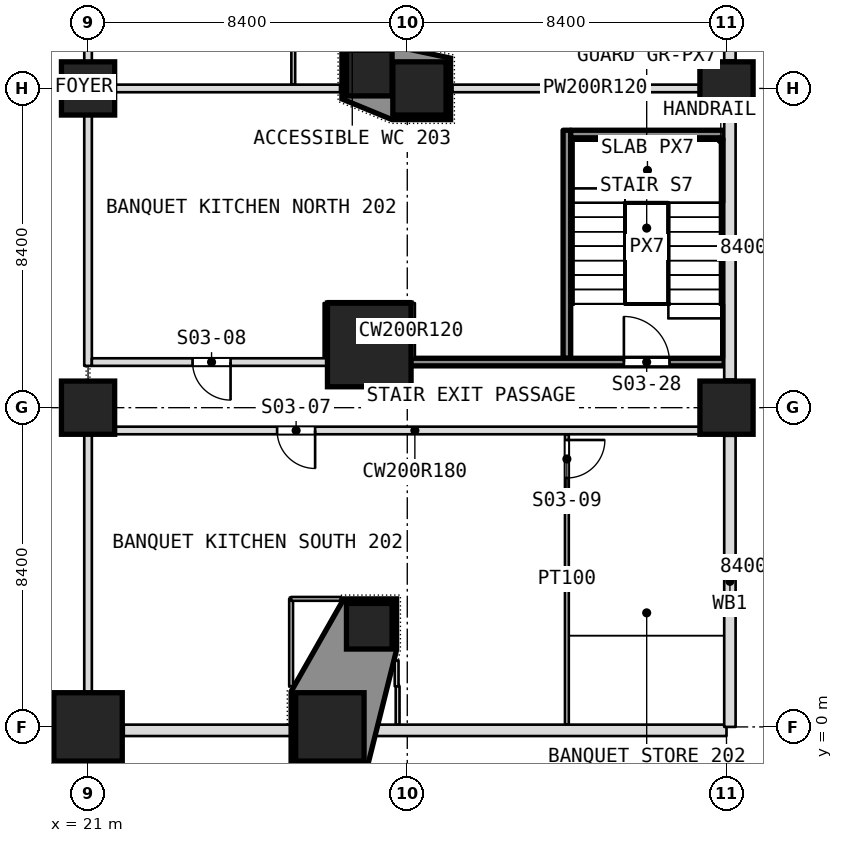
"""IFC4 building model, lengths in metres.
Left out: names, types, materials, properties, quantities, classifications, styles, units other than length and angle.
Written with IfcOpenShell. Run it as: python <this file> out.ifc"""

import sys

from ifc_helpers import new_model, si_unit, direction, frame, frame_2d, origin, origin_2d, place, context, subcontext, project, spatial, polyline, rectangle, outline, extrude, element, fill, save


model = new_model("IFC4")
c1 = context("Model", 3, precision=1e-05, world=origin(), true_north=direction((0.0, 1.0)))
c2 = subcontext(c1, "Body", "Model", "MODEL_VIEW")
j1 = project(units=[si_unit("LENGTHUNIT", "METRE"), si_unit("PLANEANGLEUNIT", "RADIAN")], contexts=[c1])
p1 = place(None, origin())
s1 = spatial("IfcSite", under=j1, at=p1, CompositionType="ELEMENT")
p2 = place(p1, origin())
s2 = spatial("IfcBuilding", under=s1, at=p2, CompositionType="ELEMENT")
p3 = place(p2, frame((0.0, 0.0, 13.0)))
s3 = spatial("IfcBuildingStorey", under=s2, at=p3, CompositionType="ELEMENT", Elevation=13.0)
p4 = place(p3, frame((21.0, 0.0, 0.0), z_axis=(0.0, 0.0, 1.0), x_axis=(1.0, 0.0, 0.0)))
e1 = element("IfcColumn", 1, at=p4, inside=s3, PredefinedType="COLUMN", context=c2, shape_type="SweptSolid", body=[
    extrude(rectangle(XDim=1.8, YDim=1.8, at=origin_2d()), origin(), (0.0, 0.0, 1.0), 8.0),
])
for number, where, z_axis, x_axis in (
    (2, (21.0, 8.4, 0.0), (0.0, 0.0, 1.0), (1.0, 0.0, 0.0)),
    (3, (37.8, 8.4, 0.0), (0.0, 0.0, 1.0), (1.0, 0.0, 0.0)),
    (4, (21.0, 16.8, 0.0), (0.0, 0.0, 1.0), (1.0, 0.0, 0.0)),
    (5, (29.72, 16.8, 0.0), (0.0, 0.0, 1.0), (1.0, 0.0, 0.0)),
    (6, (37.8, 16.8, 0.0), (0.0, 0.0, 1.0), (1.0, 0.0, 0.0)),
):
    element("IfcColumn", number, at=place(p3, frame(where, z_axis=z_axis, x_axis=x_axis)), inside=s3, PredefinedType="COLUMN", context=c2, shape_type="SweptSolid", body=[
        extrude(rectangle(XDim=1.4, YDim=1.4, at=origin_2d()), origin(), (0.0, 0.0, 1.0), 8.0),
    ])
p5 = place(p3, frame((27.363, 0.0, 0.0), z_axis=(0.0, 0.0, 1.0), x_axis=(1.0, 0.0, 0.0)))
e7 = element("IfcColumn", 7, at=p5, inside=s3, PredefinedType="COLUMN", context=c2, shape_type="SweptSolid", body=[
    extrude(rectangle(XDim=1.8, YDim=1.8, at=origin_2d()), origin(), (0.0, 0.0, 1.0), 8.0),
])
p6 = place(p3, frame((28.4, 10.05, 0.0), z_axis=(0.0, 0.0, 1.0), x_axis=(1.0, 0.0, 0.0)))
e8 = element("IfcColumn", 8, at=p6, inside=s3, PredefinedType="COLUMN", context=c2, shape_type="SweptSolid", body=[
    extrude(rectangle(XDim=2.2, YDim=2.2, at=origin_2d()), origin(), (0.0, 0.0, 1.0), 8.0),
])
p7 = place(p3, frame((37.8, 2.4, 1.0), z_axis=(1.0, 0.0, 0.0), x_axis=(0.0, 0.0, 1.0)))
e9 = element("IfcWall", 9, at=p7, inside=s3, PredefinedType="SOLIDWALL", context=c2, shape_type="SweptSolid", body=[
    extrude(outline(polyline([(0.0, 0.0), (7.0, 0.0), (7.0, 1.495), (6.414, 1.2), (0.0, 0.0)])), origin(), (0.0, 0.0, -1.0), 4.2),
])
for number, where, z_axis, x_axis in (
    (10, (28.4, 17.203, 0.0), (0.0, 0.0, 1.0), (1.0, 0.0, 0.0)),
    (11, (28.4, 2.649, 0.0), (0.0, 0.0, 1.0), (1.0, 0.0, 0.0)),
):
    element("IfcColumn", number, at=place(p3, frame(where, z_axis=z_axis, x_axis=x_axis)), inside=s3, PredefinedType="COLUMN", context=c2, shape_type="SweptSolid", body=[
        extrude(rectangle(XDim=1.2, YDim=1.2, at=origin_2d()), origin(), (0.0, 0.0, 1.0), 8.0),
    ])
p8 = place(p3, frame((33.6, 9.7, 0.0), z_axis=(0.0, 0.0, 1.0), x_axis=(0.0, 1.0, 0.0)))
e12 = element("IfcWall", 12, at=p8, inside=s3, PredefinedType="PARTITIONING", context=c2, shape_type="SweptSolid", body=[
    extrude(rectangle(XDim=6.0, YDim=0.2, at=frame_2d((3.0, 0.0))), origin(), (0.0, 0.0, 1.0), 7.68),
])
p9 = place(p3, frame((33.6, 0.06, 0.0), z_axis=(0.0, 0.0, 1.0), x_axis=(0.0, 1.0, 0.0)))
e13 = element("IfcWall", 13, at=p9, inside=s3, PredefinedType="PARTITIONING", context=c2, shape_type="SweptSolid", body=[
    extrude(rectangle(XDim=7.64, YDim=0.1, at=frame_2d((3.82, 0.0))), origin(), (0.0, 0.0, 1.0), 7.68),
])
p10 = place(p9, frame((6.49, 0.0, 0.0)))
e14 = element("IfcOpeningElement", 14, at=p10, cuts=e13, PredefinedType="OPENING", context=c2, shape_type="SweptSolid", body=[
    extrude(rectangle(XDim=1.0, YDim=2.1, at=frame_2d((0.5, 1.05))), frame((0.0, 0.05, 0.0), z_axis=(0.0, -1.0, 0.0), x_axis=(1.0, 0.0, 0.0)), (0.0, 0.0, 1.0), 0.1),
])
p11 = place(p3, frame((29.5, 9.7, 0.0), z_axis=(0.0, 0.0, 1.0), x_axis=(0.0, 1.0, 0.0)))
e15 = element("IfcWall", 15, at=p11, inside=s3, PredefinedType="PARTITIONING", context=c2, shape_type="SweptSolid", body=[
    extrude(rectangle(XDim=1.452, YDim=0.2, at=frame_2d((0.726, 0.0))), origin(), (0.0, 0.0, 1.0), 7.68),
])
p12 = place(p3, frame((29.146, 0.06, 0.0), z_axis=(0.0, 0.0, 1.0), x_axis=(0.0, 1.0, 0.0)))
e16 = element("IfcWall", 16, at=p12, inside=s3, PredefinedType="PARTITIONING", context=c2, shape_type="SweptSolid", body=[
    extrude(rectangle(XDim=1.013, YDim=0.1, at=frame_2d((0.506, 0.0))), origin(), (0.0, 0.0, 1.0), 7.68),
])
p13 = place(p3, frame((29.12, 1.069, 0.0), z_axis=(0.0, 0.0, 1.0), x_axis=(0.0, 1.0, 0.0)))
e17 = element("IfcWall", 17, at=p13, inside=s3, PredefinedType="PARTITIONING", context=c2, shape_type="SweptSolid", body=[
    extrude(rectangle(XDim=0.679, YDim=0.1, at=frame_2d((0.339, 0.0))), origin(), (0.0, 0.0, 1.0), 7.68),
])
p14 = place(p3, frame((27.3, 9.7, 0.0), z_axis=(0.0, 0.0, 1.0), x_axis=(0.0, 1.0, 0.0)))
e18 = element("IfcWall", 18, at=p14, inside=s3, PredefinedType="PARTITIONING", context=c2, shape_type="SweptSolid", body=[
    extrude(rectangle(XDim=1.452, YDim=0.2, at=frame_2d((0.726, 0.0))), origin(), (0.0, 0.0, 1.0), 7.68),
])
p15 = place(p3, frame((26.4, 16.9, 0.0), z_axis=(0.0, 0.0, 1.0), x_axis=(0.0, 1.0, 0.0)))
e19 = element("IfcWall", 19, at=p15, inside=s3, PredefinedType="PARTITIONING", context=c2, shape_type="SweptSolid", body=[
    extrude(rectangle(XDim=8.4, YDim=0.1, at=frame_2d((4.2, 0.0))), origin(), (0.0, 0.0, 1.0), 7.68),
])
p16 = place(p15, frame((3.7, 0.0, 0.0)))
e20 = element("IfcOpeningElement", 20, at=p16, cuts=e19, PredefinedType="OPENING", context=c2, shape_type="SweptSolid", body=[
    extrude(rectangle(XDim=1.0, YDim=2.1, at=frame_2d((0.5, 1.05))), frame((0.0, 0.05, 0.0), z_axis=(0.0, -1.0, 0.0), x_axis=(1.0, 0.0, 0.0)), (0.0, 0.0, 1.0), 0.1),
])
p17 = place(p3, frame((26.343, 1.071, 0.0), z_axis=(0.0, 0.0, 1.0), x_axis=(0.0, 1.0, 0.0)))
e21 = element("IfcWall", 21, at=p17, inside=s3, PredefinedType="PARTITIONING", context=c2, shape_type="SweptSolid", body=[
    extrude(rectangle(XDim=2.3, YDim=0.1, at=frame_2d((1.15, 0.0))), origin(), (0.0, 0.0, 1.0), 7.68),
])
p18 = place(p3, frame((21.0, -0.3, 0.0), z_axis=(0.0, 0.0, 1.0), x_axis=(0.0, 1.0, 0.0)))
e22 = element("IfcWall", 22, at=p18, inside=s3, PredefinedType="PARTITIONING", context=c2, shape_type="SweptSolid", body=[
    extrude(rectangle(XDim=8.2, YDim=0.2, at=frame_2d((4.1, 0.0))), origin(), (0.0, 0.0, 1.0), 7.68),
])
p19 = place(p3, frame((21.0, 9.5, 0.0), z_axis=(0.0, 0.0, 1.0), x_axis=(0.0, 1.0, 0.0)))
e23 = element("IfcWall", 23, at=p19, inside=s3, PredefinedType="PARTITIONING", context=c2, shape_type="SweptSolid", body=[
    extrude(rectangle(XDim=22.135, YDim=0.2, at=frame_2d((11.067, 0.0))), origin(), (0.0, 0.0, 1.0), 7.68),
])
p20 = place(p19, frame((9.9, 0.0, 0.0)))
e24 = element("IfcOpeningElement", 24, at=p20, cuts=e23, PredefinedType="OPENING", context=c2, shape_type="SweptSolid", body=[
    extrude(rectangle(XDim=1.0, YDim=2.1, at=frame_2d((0.5, 1.05))), frame((0.0, 0.1, 0.0), z_axis=(0.0, -1.0, 0.0), x_axis=(1.0, 0.0, 0.0)), (0.0, 0.0, 1.0), 0.2),
])
p21 = place(p19, frame((16.717, 0.0, 0.0)))
e25 = element("IfcOpeningElement", 25, at=p21, cuts=e23, PredefinedType="OPENING", context=c2, shape_type="SweptSolid", body=[
    extrude(rectangle(XDim=1.8, YDim=2.1, at=frame_2d((0.9, 1.05))), frame((0.0, 0.1, 0.0), z_axis=(0.0, -1.0, 0.0), x_axis=(1.0, 0.0, 0.0)), (0.0, 0.0, 1.0), 0.2),
])
p22 = place(p3, frame((26.341, 3.369, 0.0), z_axis=(0.0, 0.0, 1.0), x_axis=(1.0, 0.0, 0.0)))
e26 = element("IfcWall", 26, at=p22, inside=s3, PredefinedType="PARTITIONING", context=c2, shape_type="SweptSolid", body=[
    extrude(rectangle(XDim=1.311, YDim=0.1, at=frame_2d((0.656, 0.0))), origin(), (0.0, 0.0, 1.0), 7.68),
])
p23 = place(p3, frame((21.1, 7.8, 0.0), z_axis=(0.0, 0.0, 1.0), x_axis=(1.0, 0.0, 0.0)))
e27 = element("IfcWall", 27, at=p23, inside=s3, PredefinedType="PARTITIONING", context=c2, shape_type="SweptSolid", body=[
    extrude(rectangle(XDim=17.0, YDim=0.2, at=frame_2d((8.5, 0.0))), origin(), (0.0, 0.0, 1.0), 7.68),
])
p24 = place(p23, frame((4.875, 0.0, 0.0)))
e28 = element("IfcOpeningElement", 28, at=p24, cuts=e27, PredefinedType="OPENING", context=c2, shape_type="SweptSolid", body=[
    extrude(rectangle(XDim=1.0, YDim=2.1, at=frame_2d((0.5, 1.05))), frame((0.0, 0.1, 0.0), z_axis=(0.0, -1.0, 0.0), x_axis=(1.0, 0.0, 0.0)), (0.0, 0.0, 1.0), 0.2),
])
p25 = place(p3, frame((21.1, 9.6, 0.0), z_axis=(0.0, 0.0, 1.0), x_axis=(1.0, 0.0, 0.0)))
e29 = element("IfcWall", 29, at=p25, inside=s3, PredefinedType="PARTITIONING", context=c2, shape_type="SweptSolid", body=[
    extrude(rectangle(XDim=6.3, YDim=0.2, at=frame_2d((3.15, 0.0))), origin(), (0.0, 0.0, 1.0), 7.68),
])
p26 = place(p25, frame((2.65, 0.0, 0.0)))
e30 = element("IfcOpeningElement", 30, at=p26, cuts=e29, PredefinedType="OPENING", context=c2, shape_type="SweptSolid", body=[
    extrude(rectangle(XDim=1.0, YDim=2.1, at=frame_2d((0.5, 1.05))), frame((0.0, 0.1, 0.0), z_axis=(0.0, -1.0, 0.0), x_axis=(1.0, 0.0, 0.0)), (0.0, 0.0, 1.0), 0.2),
])
p27 = place(p3, frame((29.4, 9.6, 0.0), z_axis=(0.0, 0.0, 1.0), x_axis=(1.0, 0.0, 0.0)))
e31 = element("IfcWall", 31, at=p27, inside=s3, PredefinedType="PARTITIONING", context=c2, shape_type="SweptSolid", body=[
    extrude(rectangle(XDim=8.34, YDim=0.2, at=frame_2d((4.17, 0.0))), origin(), (0.0, 0.0, 1.0), 7.68),
])
p28 = place(p27, frame((5.7, 0.0, 0.0)))
e32 = element("IfcOpeningElement", 32, at=p28, cuts=e31, PredefinedType="OPENING", context=c2, shape_type="SweptSolid", body=[
    extrude(rectangle(XDim=1.2, YDim=2.1, at=frame_2d((0.6, 1.05))), frame((0.0, 0.1, 0.0), z_axis=(0.0, -1.0, 0.0), x_axis=(1.0, 0.0, 0.0)), (0.0, 0.0, 1.0), 0.2),
])
p29 = place(p3, frame((27.298, 11.15, 0.0), z_axis=(0.0, 0.0, 1.0), x_axis=(1.0, 0.0, 0.0)))
e33 = element("IfcWall", 33, at=p29, inside=s3, PredefinedType="PARTITIONING", context=c2, shape_type="SweptSolid", body=[
    extrude(rectangle(XDim=2.204, YDim=0.1, at=frame_2d((1.102, 0.0))), origin(), (0.0, 0.0, 1.0), 7.68),
])
p30 = place(p3, frame((33.7, 15.6, 0.0), z_axis=(0.0, 0.0, 1.0), x_axis=(1.0, 0.0, 0.0)))
e34 = element("IfcWall", 34, at=p30, inside=s3, PredefinedType="PARTITIONING", context=c2, shape_type="SweptSolid", body=[
    extrude(rectangle(XDim=4.04, YDim=0.2, at=frame_2d((2.02, 0.0))), origin(), (0.0, 0.0, 1.0), 7.68),
])
p31 = place(p3, frame((21.1, 16.8, 0.0), z_axis=(0.0, 0.0, 1.0), x_axis=(1.0, 0.0, 0.0)))
e35 = element("IfcWall", 35, at=p31, inside=s3, PredefinedType="PARTITIONING", context=c2, shape_type="SweptSolid", body=[
    extrude(rectangle(XDim=6.53, YDim=0.2, at=frame_2d((3.265, 0.0))), origin(), (0.0, 0.0, 1.0), 7.68),
])
p32 = place(p3, frame((30.59, 16.8, 0.0), z_axis=(0.0, 0.0, 1.0), x_axis=(1.0, 0.0, 0.0)))
e36 = element("IfcWall", 36, at=p32, inside=s3, PredefinedType="PARTITIONING", context=c2, shape_type="SweptSolid", body=[
    extrude(rectangle(XDim=7.51, YDim=0.2, at=frame_2d((3.755, 0.0))), origin(), (0.0, 0.0, 1.0), 7.68),
])
p33 = place(p3, frame((16.8, -0.09, 0.0), z_axis=(0.0, 0.0, 1.0), x_axis=(1.0, 0.0, 0.0)))
e37 = element("IfcWall", 37, at=p33, inside=s3, PredefinedType="NOTDEFINED", context=c2, shape_type="SweptSolid", body=[
    extrude(rectangle(XDim=3.26, YDim=0.3, at=frame_2d((1.63, 0.0))), origin(), (0.0, 0.0, 1.0), 8.0),
])
p34 = place(p3, frame((21.94, -0.09, 0.0), z_axis=(0.0, 0.0, 1.0), x_axis=(1.0, 0.0, 0.0)))
e38 = element("IfcWall", 38, at=p34, inside=s3, PredefinedType="NOTDEFINED", context=c2, shape_type="SweptSolid", body=[
    extrude(rectangle(XDim=4.483, YDim=0.3, at=frame_2d((2.242, 0.0))), origin(), (0.0, 0.0, 1.0), 6.78),
])
p35 = place(p3, frame((28.303, -0.09, 0.0), z_axis=(0.0, 0.0, 1.0), x_axis=(1.0, 0.0, 0.0)))
e39 = element("IfcWall", 39, at=p35, inside=s3, PredefinedType="NOTDEFINED", context=c2, shape_type="SweptSolid", body=[
    extrude(rectangle(XDim=9.497, YDim=0.3, at=frame_2d((4.749, 0.0))), origin(), (0.0, 0.0, 1.0), 6.78),
])
p36 = place(p3, frame((37.89, 0.0, 0.0), z_axis=(0.0, 0.0, 1.0), x_axis=(0.0, 1.0, 0.0)))
e40 = element("IfcWall", 40, at=p36, inside=s3, PredefinedType="NOTDEFINED", context=c2, shape_type="SweptSolid", body=[
    extrude(rectangle(XDim=7.66, YDim=0.3, at=frame_2d((3.83, 0.0))), origin(), (0.0, 0.0, 1.0), 6.78),
])
p37 = place(p3, frame((37.89, 9.14, 0.0), z_axis=(0.0, 0.0, 1.0), x_axis=(0.0, 1.0, 0.0)))
e41 = element("IfcWall", 41, at=p37, inside=s3, PredefinedType="NOTDEFINED", context=c2, shape_type="SweptSolid", body=[
    extrude(rectangle(XDim=6.92, YDim=0.3, at=frame_2d((3.46, 0.0))), origin(), (0.0, 0.0, 1.0), 8.0),
])
p38 = place(p3, frame((37.89, 17.54, 0.0), z_axis=(0.0, 0.0, 1.0), x_axis=(0.0, 1.0, 0.0)))
e42 = element("IfcWall", 42, at=p38, inside=s3, PredefinedType="NOTDEFINED", context=c2, shape_type="SweptSolid", body=[
    extrude(rectangle(XDim=6.92, YDim=0.3, at=frame_2d((3.46, 0.0))), origin(), (0.0, 0.0, 1.0), 6.78),
])
p39 = place(p3, origin())
e43 = element("IfcWall", 43, at=p39, inside=s3, PredefinedType="SOLIDWALL", context=c2, shape_type="SweptSolid", body=[
    extrude(outline(polyline([(27.68, 16.523), (27.68, 17.923), (29.013, 17.923), (30.54, 17.597), (30.54, 15.98), (28.996, 15.98), (27.68, 16.523)]), holes=[polyline([(29.02, 16.1), (30.42, 16.1), (30.42, 17.5), (29.02, 17.5), (29.02, 16.1)]), polyline([(27.8, 16.603), (29.0, 16.603), (29.0, 17.803), (27.8, 17.803), (27.8, 16.603)])]), origin(), (0.0, 0.0, 1.0), 8.0),
])
p40 = place(p3, origin())
e44 = element("IfcWall", 44, at=p40, inside=s3, PredefinedType="SOLIDWALL", context=c2, shape_type="SweptSolid", body=[
    extrude(outline(polyline([(26.343, 0.932), (27.73, 3.369), (29.12, 3.369), (29.12, 2.034), (28.357, -1.02), (26.343, -1.02), (26.343, 0.932)]), holes=[polyline([(27.8, 2.049), (29.0, 2.049), (29.0, 3.249), (27.8, 3.249), (27.8, 2.049)]), polyline([(26.463, -0.9), (28.263, -0.9), (28.263, 0.9), (26.463, 0.9), (26.463, -0.9)])]), origin(), (0.0, 0.0, 1.0), 8.0),
])
p41 = place(p24, origin())
e45 = element("IfcDoor", 45, at=p41, inside=s3, OperationType="SINGLE_SWING_LEFT", PredefinedType="DOOR", context=c2, shape_type="SweptSolid", body=[
    extrude(rectangle(XDim=1.0, YDim=2.1, at=frame_2d((0.5, 1.05))), frame((0.0, 0.025, 0.0), z_axis=(0.0, -1.0, 0.0), x_axis=(1.0, 0.0, 0.0)), (0.0, 0.0, 1.0), 0.05),
])
fill(e28, e45)
p42 = place(p26, origin())
e46 = element("IfcDoor", 46, at=p42, inside=s3, OperationType="SINGLE_SWING_LEFT", PredefinedType="DOOR", context=c2, shape_type="SweptSolid", body=[
    extrude(rectangle(XDim=1.0, YDim=2.1, at=frame_2d((0.5, 1.05))), frame((0.0, 0.025, 0.0), z_axis=(0.0, -1.0, 0.0), x_axis=(1.0, 0.0, 0.0)), (0.0, 0.0, 1.0), 0.05),
])
fill(e30, e46)
p43 = place(p10, origin())
e47 = element("IfcDoor", 47, at=p43, inside=s3, OperationType="SINGLE_SWING_LEFT", PredefinedType="DOOR", context=c2, shape_type="SweptSolid", body=[
    extrude(rectangle(XDim=1.0, YDim=2.1, at=frame_2d((0.5, 1.05))), frame((0.0, 0.025, 0.0), z_axis=(0.0, -1.0, 0.0), x_axis=(1.0, 0.0, 0.0)), (0.0, 0.0, 1.0), 0.05),
])
fill(e14, e47)
p44 = place(p28, origin())
e48 = element("IfcDoor", 48, at=p44, inside=s3, OperationType="SINGLE_SWING_LEFT", PredefinedType="DOOR", context=c2, shape_type="SweptSolid", body=[
    extrude(rectangle(XDim=1.2, YDim=2.1, at=frame_2d((0.6, 1.05))), frame((0.0, 0.025, 0.0), z_axis=(0.0, -1.0, 0.0), x_axis=(1.0, 0.0, 0.0)), (0.0, 0.0, 1.0), 0.05),
])
fill(e32, e48)
save(model, sys.argv[1])
